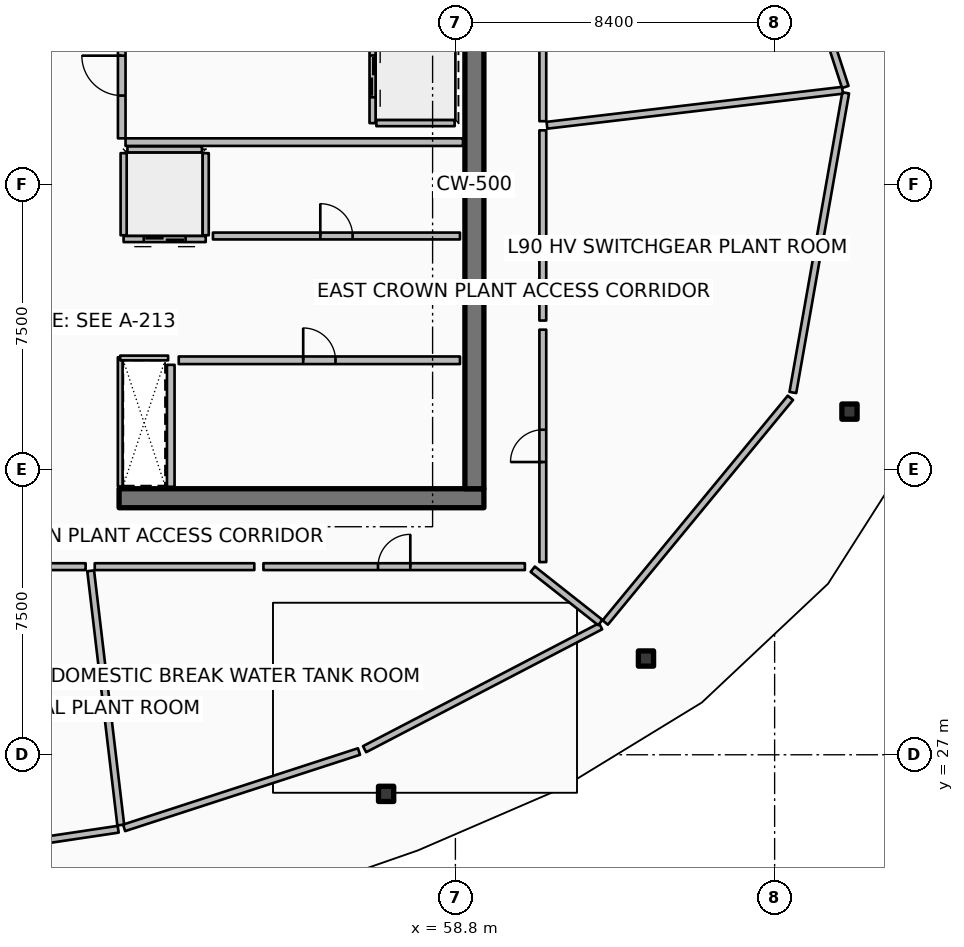
"""IFC4 building model, lengths in metres.
Left out: names, types, materials, properties, quantities, classifications, styles, units other than length and angle.
Written with IfcOpenShell. Run it as: python <this file> out.ifc"""

import sys

from ifc_helpers import new_model, si_unit, direction, frame, frame_2d, origin, origin_2d, place, context, subcontext, project, spatial, rectangle, hollow_rectangle, extrude, element, fill, save


model = new_model("IFC4")
c1 = context("Model", 3, precision=1e-05, world=origin(), true_north=direction((0.0, 1.0)))
c2 = subcontext(c1, "Body", "Model", "MODEL_VIEW")
j1 = project(units=[si_unit("LENGTHUNIT", "METRE"), si_unit("PLANEANGLEUNIT", "RADIAN")], contexts=[c1])
p1 = place(None, origin())
s1 = spatial("IfcSite", under=j1, at=p1, CompositionType="ELEMENT")
p2 = place(p1, origin())
s2 = spatial("IfcBuilding", under=s1, at=p2, CompositionType="ELEMENT")
p3 = place(p2, frame((0.0, 0.0, 359.6)))
s3 = spatial("IfcBuildingStorey", under=s2, at=p3, CompositionType="ELEMENT", Elevation=359.6)
p4 = place(p3, frame((49.95, 33.75, 0.0), z_axis=(0.0, 0.0, 1.0), x_axis=(1.0, 0.0, 0.0)))
e1 = element("IfcWall", 1, at=p4, inside=s3, PredefinedType="SHEAR", context=c2, shape_type="SweptSolid", body=[
    extrude(rectangle(XDim=9.6, YDim=0.5, at=frame_2d((4.8, 0.0))), origin(), (0.0, 0.0, 1.0), 3.6),
])
p5 = place(p3, frame((59.3, 34.0, 0.0), z_axis=(0.0, 0.0, 1.0), x_axis=(0.0, 1.0, 0.0)))
e2 = element("IfcWall", 2, at=p5, inside=s3, PredefinedType="SHEAR", context=c2, shape_type="SweptSolid", body=[
    extrude(rectangle(XDim=16.0, YDim=0.5, at=frame_2d((8.0, 0.0))), origin(), (0.0, 0.0, 1.0), 3.6),
])
for number, where, z_axis, x_axis in (
    (3, (56.977, 25.971, 0.0), (0.0, 0.0, 1.0), (1.0, 0.0, 0.0)),
    (4, (63.815, 29.532, 0.0), (0.0, 0.0, 1.0), (1.0, 0.0, 0.0)),
    (5, (69.17, 36.03, 0.0), (0.0, 0.0, 1.0), (1.0, 0.0, 0.0)),
):
    element("IfcColumn", number, at=place(p3, frame(where, z_axis=z_axis, x_axis=x_axis)), inside=s3, PredefinedType="COLUMN", context=c2, shape_type="SweptSolid", body=[
        extrude(hollow_rectangle(XDim=0.4, YDim=0.4, WallThickness=0.02, InnerFilletRadius=0.02, OuterFilletRadius=0.04, at=origin_2d()), origin(), (0.0, 0.0, 1.0), 3.32),
    ])
p6 = place(p3, frame((51.52, 37.38, 0.0), z_axis=(0.0, 0.0, 1.0), x_axis=(1.0, 0.0, 0.0)))
e6 = element("IfcWall", 6, at=p6, inside=s3, PredefinedType="PARTITIONING", context=c2, shape_type="SweptSolid", body=[
    extrude(rectangle(XDim=7.4, YDim=0.2, at=frame_2d((3.7, 0.0))), origin(), (0.0, 0.0, 1.0), 3.32),
])
p7 = place(p6, frame((3.275, 0.0, 0.0)))
e7 = element("IfcOpeningElement", 7, at=p7, cuts=e6, PredefinedType="OPENING", context=c2, shape_type="SweptSolid", body=[
    extrude(rectangle(XDim=0.85, YDim=2.06, at=frame_2d((0.425, 1.03))), frame((0.0, 0.11, 0.0), z_axis=(0.0, -1.0, 0.0), x_axis=(1.0, 0.0, 0.0)), (0.0, 0.0, 1.0), 0.22),
])
p8 = place(p3, frame((51.31, 34.05, 0.0), z_axis=(0.0, 0.0, 1.0), x_axis=(0.0, 1.0, 0.0)))
e8 = element("IfcWall", 8, at=p8, inside=s3, PredefinedType="PARTITIONING", context=c2, shape_type="SweptSolid", body=[
    extrude(rectangle(XDim=3.21, YDim=0.2, at=frame_2d((1.605, 0.0))), origin(), (0.0, 0.0, 1.0), 3.32),
])
p9 = place(p3, frame((56.62, 46.08, 0.0), z_axis=(0.0, 0.0, 1.0), x_axis=(0.0, -1.0, 0.0)))
e9 = element("IfcWall", 9, at=p9, inside=s3, PredefinedType="PARTITIONING", context=c2, shape_type="SweptSolid", body=[
    extrude(rectangle(XDim=2.46, YDim=0.16, at=frame_2d((1.23, 0.0))), origin(), (0.0, 0.0, 1.0), 3.32),
])
p10 = place(p9, frame((0.68, 0.0, 0.0)))
e10 = element("IfcOpeningElement", 10, at=p10, cuts=e9, PredefinedType="OPENING", context=c2, shape_type="SweptSolid", body=[
    extrude(rectangle(XDim=1.1, YDim=2.1, at=frame_2d((0.55, 1.05))), frame((0.0, 0.09, 0.0), z_axis=(0.0, -1.0, 0.0), x_axis=(1.0, 0.0, 0.0)), (0.0, 0.0, 1.0), 0.18),
])
p11 = place(p3, frame((56.72, 43.62, 0.0), z_axis=(0.0, 0.0, 1.0), x_axis=(1.0, 0.0, 0.0)))
e11 = element("IfcWall", 11, at=p11, inside=s3, PredefinedType="PARTITIONING", context=c2, shape_type="SweptSolid", body=[
    extrude(rectangle(XDim=2.06, YDim=0.16, at=frame_2d((1.03, 0.0))), origin(), (0.0, 0.0, 1.0), 3.32),
])
p12 = place(p3, frame((52.23, 40.57, 0.0), z_axis=(0.0, 0.0, 1.0), x_axis=(-1.0, 0.0, 0.0)))
e12 = element("IfcWall", 12, at=p12, inside=s3, PredefinedType="PARTITIONING", context=c2, shape_type="SweptSolid", body=[
    extrude(rectangle(XDim=2.16, YDim=0.16, at=frame_2d((1.08, 0.0))), origin(), (0.0, 0.0, 1.0), 3.32),
])
p13 = place(p12, frame((0.53, 0.0, 0.0)))
e13 = element("IfcOpeningElement", 13, at=p13, cuts=e12, PredefinedType="OPENING", context=c2, shape_type="SweptSolid", body=[
    extrude(rectangle(XDim=1.1, YDim=2.1, at=frame_2d((0.55, 1.05))), frame((0.0, 0.09, 0.0), z_axis=(0.0, -1.0, 0.0), x_axis=(1.0, 0.0, 0.0)), (0.0, 0.0, 1.0), 0.18),
])
for number, where, z_axis, x_axis in (
    (14, (52.23, 40.67, 0.0), (0.0, 0.0, 1.0), (0.0, 1.0, 0.0)),
    (15, (50.07, 40.67, 0.0), (0.0, 0.0, 1.0), (0.0, 1.0, 0.0)),
):
    element("IfcWall", number, at=place(p3, frame(where, z_axis=z_axis, x_axis=x_axis)), inside=s3, PredefinedType="PARTITIONING", context=c2, shape_type="SweptSolid", body=[
        extrude(rectangle(XDim=2.16, YDim=0.16, at=frame_2d((1.08, 0.0))), origin(), (0.0, 0.0, 1.0), 3.32),
    ])
p14 = place(p3, frame((50.17, 42.93, 0.0), z_axis=(0.0, 0.0, 1.0), x_axis=(1.0, 0.0, 0.0)))
e16 = element("IfcWall", 16, at=p14, inside=s3, PredefinedType="PARTITIONING", context=c2, shape_type="SweptSolid", body=[
    extrude(rectangle(XDim=1.96, YDim=0.16, at=frame_2d((0.98, 0.0))), origin(), (0.0, 0.0, 1.0), 3.32),
])
p15 = place(p3, frame((52.42, 40.65, 0.0), z_axis=(0.0, 0.0, 1.0), x_axis=(1.0, 0.0, 0.0)))
e17 = element("IfcWall", 17, at=p15, inside=s3, PredefinedType="PARTITIONING", context=c2, shape_type="SweptSolid", body=[
    extrude(rectangle(XDim=6.5, YDim=0.18, at=frame_2d((3.25, 0.0))), origin(), (0.0, 0.0, 1.0), 3.32),
])
p16 = place(p15, frame((2.825, 0.0, 0.0)))
e18 = element("IfcOpeningElement", 18, at=p16, cuts=e17, PredefinedType="OPENING", context=c2, shape_type="SweptSolid", body=[
    extrude(rectangle(XDim=0.85, YDim=2.06, at=frame_2d((0.425, 1.03))), frame((0.0, 0.1, 0.0), z_axis=(0.0, -1.0, 0.0), x_axis=(1.0, 0.0, 0.0)), (0.0, 0.0, 1.0), 0.2),
])
p17 = place(p3, frame((50.12, 43.12, 0.0), z_axis=(0.0, 0.0, 1.0), x_axis=(1.0, 0.0, 0.0)))
e19 = element("IfcWall", 19, at=p17, inside=s3, PredefinedType="PARTITIONING", context=c2, shape_type="SweptSolid", body=[
    extrude(rectangle(XDim=8.88, YDim=0.2, at=frame_2d((4.44, 0.0))), origin(), (0.0, 0.0, 1.0), 3.32),
])
p18 = place(p3, frame((50.02, 43.22, 0.0), z_axis=(0.0, 0.0, 1.0), x_axis=(0.0, 1.0, 0.0)))
e20 = element("IfcWall", 20, at=p18, inside=s3, PredefinedType="PARTITIONING", context=c2, shape_type="SweptSolid", body=[
    extrude(rectangle(XDim=3.3, YDim=0.2, at=frame_2d((1.65, 0.0))), origin(), (0.0, 0.0, 1.0), 3.32),
])
p19 = place(p18, frame((1.125, 0.0, 0.0)))
e21 = element("IfcOpeningElement", 21, at=p19, cuts=e20, PredefinedType="OPENING", context=c2, shape_type="SweptSolid", body=[
    extrude(rectangle(XDim=1.05, YDim=2.1, at=frame_2d((0.525, 1.05))), frame((0.0, 0.11, 0.0), z_axis=(0.0, -1.0, 0.0), x_axis=(1.0, 0.0, 0.0)), (0.0, 0.0, 1.0), 0.22),
])
p20 = place(p3, frame((49.98, 34.06, 0.0), z_axis=(0.0, 0.0, 1.0), x_axis=(0.0, 1.0, 0.0)))
e22 = element("IfcWall", 22, at=p20, inside=s3, PredefinedType="PARTITIONING", context=c2, shape_type="SweptSolid", body=[
    extrude(rectangle(XDim=3.4, YDim=0.125, at=frame_2d((1.7, 0.0))), origin(), (0.0, 0.0, 1.0), 2.76),
])
p21 = place(p3, frame((49.98, 37.44, 0.0), z_axis=(0.0, 0.0, 1.0), x_axis=(1.0, 0.0, 0.0)))
e23 = element("IfcWall", 23, at=p21, inside=s3, PredefinedType="PARTITIONING", context=c2, shape_type="SweptSolid", body=[
    extrude(rectangle(XDim=1.26, YDim=0.125, at=frame_2d((0.63, 0.0))), origin(), (0.0, 0.0, 1.0), 2.76),
])
p22 = place(p3, frame((43.001, 24.006, 0.0), z_axis=(0.0, 0.0, 1.0), x_axis=(0.989034336252, 0.147685753256, 0.0)))
e24 = element("IfcWall", 24, at=p22, inside=s3, PredefinedType="PARTITIONING", context=c2, shape_type="SweptSolid", body=[
    extrude(rectangle(XDim=7.003, YDim=0.18, at=frame_2d((3.501, 0.0))), origin(), (0.0, 0.0, 1.0), 2.76),
])
p23 = place(p3, frame((50.082, 25.077, 0.0), z_axis=(0.0, 0.0, 1.0), x_axis=(0.95105283999, 0.309028308649, 0.0)))
e25 = element("IfcWall", 25, at=p23, inside=s3, PredefinedType="PARTITIONING", context=c2, shape_type="SweptSolid", body=[
    extrude(rectangle(XDim=6.499, YDim=0.18, at=frame_2d((3.25, 0.0))), origin(), (0.0, 0.0, 1.0), 2.76),
])
p24 = place(p3, frame((56.41, 27.147, 0.0), z_axis=(0.0, 0.0, 1.0), x_axis=(0.886949494865, 0.461866423935, 0.0)))
e26 = element("IfcWall", 26, at=p24, inside=s3, PredefinedType="PARTITIONING", context=c2, shape_type="SweptSolid", body=[
    extrude(rectangle(XDim=7.002, YDim=0.18, at=frame_2d((3.501, 0.0))), origin(), (0.0, 0.0, 1.0), 2.76),
])
p25 = place(p3, frame((62.742, 30.48, 0.0), z_axis=(0.0, 0.0, 1.0), x_axis=(0.636018833443, 0.771673534278, 0.0)))
e27 = element("IfcWall", 27, at=p25, inside=s3, PredefinedType="PARTITIONING", context=c2, shape_type="SweptSolid", body=[
    extrude(rectangle(XDim=7.661, YDim=0.18, at=frame_2d((3.831, 0.0))), origin(), (0.0, 0.0, 1.0), 2.76),
])
p26 = place(p3, frame((67.68, 36.532, 0.0), z_axis=(0.0, 0.0, 1.0), x_axis=(0.173668776466, 0.984804120666, 0.0)))
e28 = element("IfcWall", 28, at=p26, inside=s3, PredefinedType="PARTITIONING", context=c2, shape_type="SweptSolid", body=[
    extrude(rectangle(XDim=8.006, YDim=0.18, at=frame_2d((4.003, 0.0))), origin(), (0.0, 0.0, 1.0), 2.76),
])
p27 = place(p3, frame((69.059, 44.572, 0.0), z_axis=(0.0, 0.0, 1.0), x_axis=(-0.309024234991, 0.951054163646, 0.0)))
e29 = element("IfcWall", 29, at=p27, inside=s3, PredefinedType="PARTITIONING", context=c2, shape_type="SweptSolid", body=[
    extrude(rectangle(XDim=8.124, YDim=0.18, at=frame_2d((4.062, 0.0))), origin(), (0.0, 0.0, 1.0), 2.76),
])
p28 = place(p3, frame((45.286, 31.95, 0.0), z_axis=(0.0, 0.0, 1.0), x_axis=(1.0, 0.0, 0.0)))
e30 = element("IfcWall", 30, at=p28, inside=s3, PredefinedType="PARTITIONING", context=c2, shape_type="SweptSolid", body=[
    extrude(rectangle(XDim=3.784, YDim=0.18, at=frame_2d((1.892, 0.0))), origin(), (0.0, 0.0, 1.0), 2.76),
])
p29 = place(p3, frame((49.202, 31.841, 0.0), z_axis=(0.0, 0.0, 1.0), x_axis=(0.117541495417, -0.993067971921, 0.0)))
e31 = element("IfcWall", 31, at=p29, inside=s3, PredefinedType="PARTITIONING", context=c2, shape_type="SweptSolid", body=[
    extrude(rectangle(XDim=6.736, YDim=0.18, at=frame_2d((3.368, 0.0))), origin(), (0.0, 0.0, 1.0), 2.76),
])
p30 = place(p3, frame((49.31, 31.95, 0.0), z_axis=(0.0, 0.0, 1.0), x_axis=(1.0, 0.0, 0.0)))
e32 = element("IfcWall", 32, at=p30, inside=s3, PredefinedType="PARTITIONING", context=c2, shape_type="SweptSolid", body=[
    extrude(rectangle(XDim=4.199, YDim=0.18, at=frame_2d((2.099, 0.0))), origin(), (0.0, 0.0, 1.0), 2.76),
])
p31 = place(p3, frame((53.748, 31.95, 0.0), z_axis=(0.0, 0.0, 1.0), x_axis=(1.0, 0.0, 0.0)))
e33 = element("IfcWall", 33, at=p31, inside=s3, PredefinedType="PARTITIONING", context=c2, shape_type="SweptSolid", body=[
    extrude(rectangle(XDim=6.88, YDim=0.18, at=frame_2d((3.44, 0.0))), origin(), (0.0, 0.0, 1.0), 2.76),
])
p32 = place(p31, frame((3.015, 0.0, 0.0)))
e34 = element("IfcOpeningElement", 34, at=p32, cuts=e33, PredefinedType="OPENING", context=c2, shape_type="SweptSolid", body=[
    extrude(rectangle(XDim=0.85, YDim=2.06, at=frame_2d((0.425, 1.03))), frame((0.0, 0.1, 0.0), z_axis=(0.0, -1.0, 0.0), x_axis=(1.0, 0.0, 0.0)), (0.0, 0.0, 1.0), 0.2),
])
p33 = place(p3, frame((60.835, 31.882, 0.0), z_axis=(0.0, 0.0, 1.0), x_axis=(0.785329646864, -0.619077818821, 0.0)))
e35 = element("IfcWall", 35, at=p33, inside=s3, PredefinedType="PARTITIONING", context=c2, shape_type="SweptSolid", body=[
    extrude(rectangle(XDim=2.264, YDim=0.18, at=frame_2d((1.132, 0.0))), origin(), (0.0, 0.0, 1.0), 2.76),
])
p34 = place(p3, frame((61.1, 32.07, 0.0), z_axis=(0.0, 0.0, 1.0), x_axis=(0.0, 1.0, 0.0)))
e36 = element("IfcWall", 36, at=p34, inside=s3, PredefinedType="PARTITIONING", context=c2, shape_type="SweptSolid", body=[
    extrude(rectangle(XDim=6.115, YDim=0.18, at=frame_2d((3.058, 0.0))), origin(), (0.0, 0.0, 1.0), 2.76),
])
p35 = place(p34, frame((2.633, 0.0, 0.0)))
e37 = element("IfcOpeningElement", 37, at=p35, cuts=e36, PredefinedType="OPENING", context=c2, shape_type="SweptSolid", body=[
    extrude(rectangle(XDim=0.85, YDim=2.06, at=frame_2d((0.425, 1.03))), frame((0.0, 0.1, 0.0), z_axis=(0.0, -1.0, 0.0), x_axis=(1.0, 0.0, 0.0)), (0.0, 0.0, 1.0), 0.2),
])
p36 = place(p3, frame((61.1, 38.425, 0.0), z_axis=(0.0, 0.0, 1.0), x_axis=(0.0, 1.0, 0.0)))
e38 = element("IfcWall", 38, at=p36, inside=s3, PredefinedType="PARTITIONING", context=c2, shape_type="SweptSolid", body=[
    extrude(rectangle(XDim=5.005, YDim=0.18, at=frame_2d((2.502, 0.0))), origin(), (0.0, 0.0, 1.0), 2.76),
])
p37 = place(p3, frame((61.209, 43.563, 0.0), z_axis=(0.0, 0.0, 1.0), x_axis=(0.993070558818, 0.117519637545, 0.0)))
e39 = element("IfcWall", 39, at=p37, inside=s3, PredefinedType="PARTITIONING", context=c2, shape_type="SweptSolid", body=[
    extrude(rectangle(XDim=7.83, YDim=0.18, at=frame_2d((3.915, 0.0))), origin(), (0.0, 0.0, 1.0), 2.76),
])
p38 = place(p3, frame((61.1, 43.67, 0.0), z_axis=(0.0, 0.0, 1.0), x_axis=(0.0, 1.0, 0.0)))
e40 = element("IfcWall", 40, at=p38, inside=s3, PredefinedType="PARTITIONING", context=c2, shape_type="SweptSolid", body=[
    extrude(rectangle(XDim=5.546, YDim=0.18, at=frame_2d((2.773, 0.0))), origin(), (0.0, 0.0, 1.0), 2.76),
])
p39 = place(p38, frame((2.348, 0.0, 0.0)))
e41 = element("IfcOpeningElement", 41, at=p39, cuts=e40, PredefinedType="OPENING", context=c2, shape_type="SweptSolid", body=[
    extrude(rectangle(XDim=0.85, YDim=2.06, at=frame_2d((0.425, 1.03))), frame((0.0, 0.1, 0.0), z_axis=(0.0, -1.0, 0.0), x_axis=(1.0, 0.0, 0.0)), (0.0, 0.0, 1.0), 0.2),
])
p40 = place(p7, origin())
e42 = element("IfcDoor", 42, at=p40, inside=s3, OperationType="SINGLE_SWING_LEFT", PredefinedType="DOOR", context=c2, shape_type="SweptSolid", body=[
    extrude(rectangle(XDim=0.85, YDim=2.06, at=frame_2d((0.425, 1.03))), frame((0.0, 0.025, 0.0), z_axis=(0.0, -1.0, 0.0), x_axis=(1.0, 0.0, 0.0)), (0.0, 0.0, 1.0), 0.05),
])
fill(e7, e42)
p41 = place(p10, origin())
e43 = element("IfcDoor", 43, at=p41, inside=s3, OperationType="DOUBLE_DOOR_SLIDING", PredefinedType="DOOR", context=c2, shape_type="SweptSolid", body=[
    extrude(rectangle(XDim=1.1, YDim=2.1, at=frame_2d((0.55, 1.05))), frame((0.0, 0.025, 0.0), z_axis=(0.0, -1.0, 0.0), x_axis=(1.0, 0.0, 0.0)), (0.0, 0.0, 1.0), 0.05),
])
fill(e10, e43)
p42 = place(p13, origin())
e44 = element("IfcDoor", 44, at=p42, inside=s3, OperationType="DOUBLE_DOOR_SLIDING", PredefinedType="DOOR", context=c2, shape_type="SweptSolid", body=[
    extrude(rectangle(XDim=1.1, YDim=2.1, at=frame_2d((0.55, 1.05))), frame((0.0, 0.025, 0.0), z_axis=(0.0, -1.0, 0.0), x_axis=(1.0, 0.0, 0.0)), (0.0, 0.0, 1.0), 0.05),
])
fill(e13, e44)
p43 = place(p16, origin())
e45 = element("IfcDoor", 45, at=p43, inside=s3, OperationType="SINGLE_SWING_LEFT", PredefinedType="DOOR", context=c2, shape_type="SweptSolid", body=[
    extrude(rectangle(XDim=0.85, YDim=2.06, at=frame_2d((0.425, 1.03))), frame((0.0, 0.025, 0.0), z_axis=(0.0, -1.0, 0.0), x_axis=(1.0, 0.0, 0.0)), (0.0, 0.0, 1.0), 0.05),
])
fill(e18, e45)
p44 = place(p19, origin())
e46 = element("IfcDoor", 46, at=p44, inside=s3, OperationType="SINGLE_SWING_RIGHT", PredefinedType="DOOR", context=c2, shape_type="SweptSolid", body=[
    extrude(rectangle(XDim=1.05, YDim=2.1, at=frame_2d((0.525, 1.05))), frame((0.0, 0.025, 0.0), z_axis=(0.0, -1.0, 0.0), x_axis=(1.0, 0.0, 0.0)), (0.0, 0.0, 1.0), 0.05),
])
fill(e21, e46)
p45 = place(p32, origin())
e47 = element("IfcDoor", 47, at=p45, inside=s3, OperationType="SINGLE_SWING_RIGHT", PredefinedType="DOOR", context=c2, shape_type="SweptSolid", body=[
    extrude(rectangle(XDim=0.85, YDim=2.06, at=frame_2d((0.425, 1.03))), frame((0.0, 0.025, 0.0), z_axis=(0.0, -1.0, 0.0), x_axis=(1.0, 0.0, 0.0)), (0.0, 0.0, 1.0), 0.05),
])
fill(e34, e47)
p46 = place(p35, origin())
e48 = element("IfcDoor", 48, at=p46, inside=s3, OperationType="SINGLE_SWING_LEFT", PredefinedType="DOOR", context=c2, shape_type="SweptSolid", body=[
    extrude(rectangle(XDim=0.85, YDim=2.06, at=frame_2d((0.425, 1.03))), frame((0.0, 0.025, 0.0), z_axis=(0.0, -1.0, 0.0), x_axis=(1.0, 0.0, 0.0)), (0.0, 0.0, 1.0), 0.05),
])
fill(e37, e48)
save(model, sys.argv[1])
